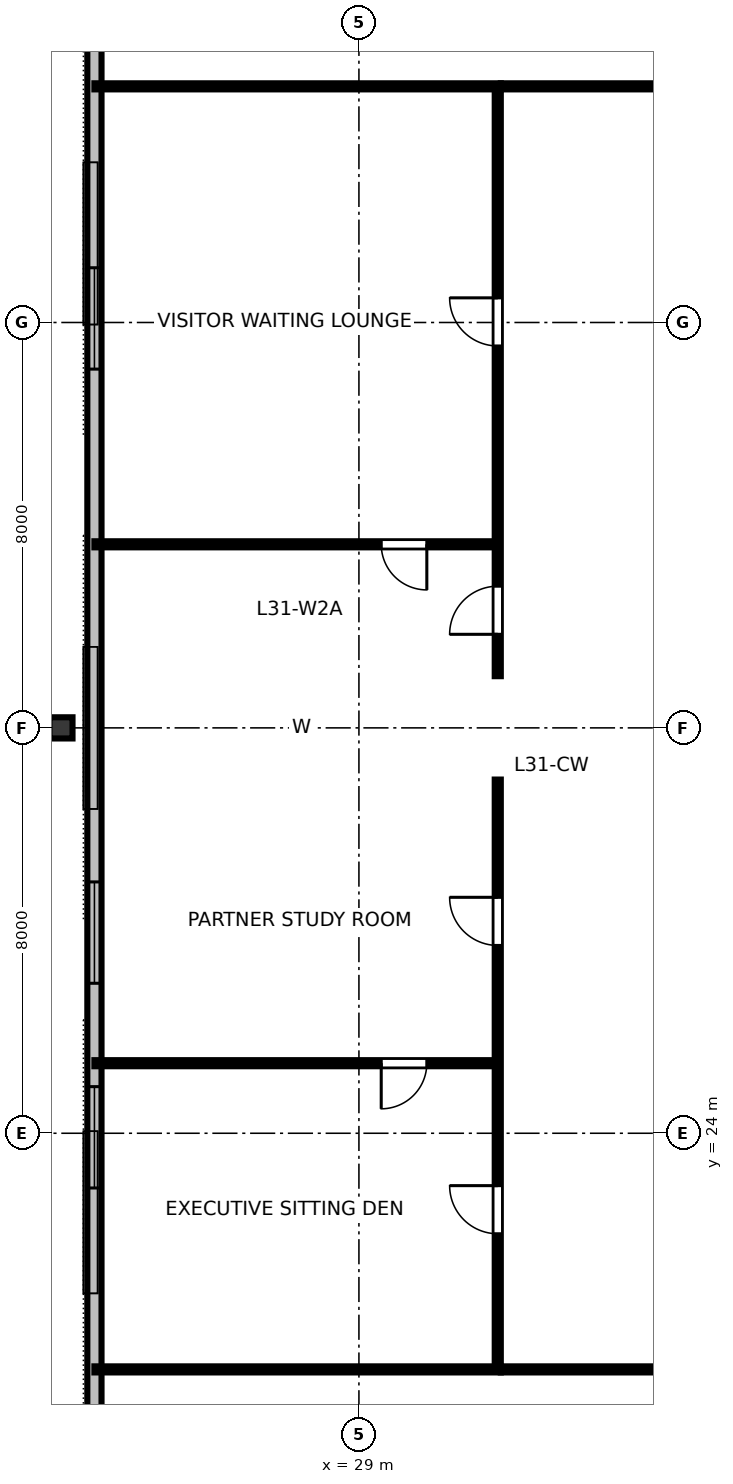
"""IFC4 building model, lengths in metres.
Left out: names, types, materials, properties, quantities, classifications, styles, units other than length and angle.
Written with IfcOpenShell. Run it as: python <this file> out.ifc"""

import sys

from ifc_helpers import new_model, si_unit, direction, frame, frame_2d, origin, origin_2d, place, context, subcontext, project, spatial, rectangle, i_section, extrude, element, fill, save


model = new_model("IFC4")
c1 = context("Model", 3, precision=1e-05, world=origin(), true_north=direction((0.0, 1.0)))
c2 = subcontext(c1, "Body", "Model", "MODEL_VIEW")
j1 = project(units=[si_unit("LENGTHUNIT", "METRE"), si_unit("PLANEANGLEUNIT", "RADIAN")], contexts=[c1])
p1 = place(None, origin())
s1 = spatial("IfcSite", under=j1, at=p1, CompositionType="ELEMENT")
p2 = place(p1, origin())
s2 = spatial("IfcBuilding", under=s1, at=p2, CompositionType="ELEMENT")
p3 = place(p2, frame((0.0, 0.0, 120.4)))
s3 = spatial("IfcBuildingStorey", under=s2, at=p3, CompositionType="ELEMENT", Elevation=120.4)
p4 = place(p3, frame((23.12, 32.0, 0.0), z_axis=(0.0, 0.0, 1.0), x_axis=(0.0, 1.0, 0.0)))
e1 = element("IfcColumn", 1, at=p4, inside=s3, PredefinedType="COLUMN", context=c2, shape_type="SweptSolid", body=[
    extrude(i_section(OverallWidth=0.418, OverallDepth=0.455, WebThickness=0.042, FlangeThickness=0.068, FilletRadius=0.025, at=origin_2d()), origin(), (0.0, 0.0, 1.0), 3.358),
])
p5 = place(p3, frame((23.78, 47.24, 0.0), z_axis=(0.0, 0.0, 1.0), x_axis=(0.0, -1.0, 0.0)))
e2 = element("IfcWall", 2, at=p5, inside=s3, PredefinedType="STANDARD", context=c2, shape_type="SweptSolid", body=[
    extrude(rectangle(XDim=30.48, YDim=0.28, at=frame_2d((15.24, 0.0))), origin(), (0.0, 0.0, 1.0), 3.36),
])
p6 = place(p5, frame((6.16, 0.0, 0.8)))
e3 = element("IfcOpeningElement", 3, at=p6, cuts=e2, PredefinedType="OPENING", context=c2, shape_type="SweptSolid", body=[
    extrude(rectangle(XDim=2.0, YDim=1.95, at=frame_2d((1.0, 0.975))), frame((0.0, 0.15, 0.0), z_axis=(0.0, -1.0, 0.0), x_axis=(1.0, 0.0, 0.0)), (0.0, 0.0, 1.0), 0.3),
])
p7 = place(p5, frame((18.28, 0.0, 0.8)))
e4 = element("IfcOpeningElement", 4, at=p7, cuts=e2, PredefinedType="OPENING", context=c2, shape_type="SweptSolid", body=[
    extrude(rectangle(XDim=2.0, YDim=1.95, at=frame_2d((1.0, 0.975))), frame((0.0, 0.15, 0.0), z_axis=(0.0, -1.0, 0.0), x_axis=(1.0, 0.0, 0.0)), (0.0, 0.0, 1.0), 0.3),
])
p8 = place(p5, frame((22.32, 0.0, 0.8)))
e5 = element("IfcOpeningElement", 5, at=p8, cuts=e2, PredefinedType="OPENING", context=c2, shape_type="SweptSolid", body=[
    extrude(rectangle(XDim=2.0, YDim=1.95, at=frame_2d((1.0, 0.975))), frame((0.0, 0.15, 0.0), z_axis=(0.0, -1.0, 0.0), x_axis=(1.0, 0.0, 0.0)), (0.0, 0.0, 1.0), 0.3),
])
p9 = place(p3, frame((31.8, 19.34, 0.0), z_axis=(0.0, 0.0, 1.0), x_axis=(1.0, 0.0, 0.0)))
e6 = element("IfcWall", 6, at=p9, inside=s3, PredefinedType="PARTITIONING", context=c2, shape_type="SweptSolid", body=[
    extrude(rectangle(XDim=28.4, YDim=0.12, at=frame_2d((14.2, 0.0))), origin(), (0.0, 0.0, 1.0), 2.64),
])
p10 = place(p9, frame((7.878, 0.0, 0.0)))
e7 = element("IfcOpeningElement", 7, at=p10, cuts=e6, PredefinedType="OPENING", context=c2, shape_type="SweptSolid", body=[
    extrude(rectangle(XDim=0.95, YDim=2.15, at=frame_2d((0.475, 1.075))), frame((0.0, 0.07, 0.0), z_axis=(0.0, -1.0, 0.0), x_axis=(1.0, 0.0, 0.0)), (0.0, 0.0, 1.0), 0.14),
])
p11 = place(p9, frame((21.938, 0.0, 0.0)))
e8 = element("IfcOpeningElement", 8, at=p11, cuts=e6, PredefinedType="OPENING", context=c2, shape_type="SweptSolid", body=[
    extrude(rectangle(XDim=0.95, YDim=2.15, at=frame_2d((0.475, 1.075))), frame((0.0, 0.07, 0.0), z_axis=(0.0, -1.0, 0.0), x_axis=(1.0, 0.0, 0.0)), (0.0, 0.0, 1.0), 0.14),
])
p12 = place(p3, frame((31.8, 44.66, 0.0), z_axis=(0.0, 0.0, 1.0), x_axis=(1.0, 0.0, 0.0)))
e9 = element("IfcWall", 9, at=p12, inside=s3, PredefinedType="PARTITIONING", context=c2, shape_type="SweptSolid", body=[
    extrude(rectangle(XDim=28.4, YDim=0.12, at=frame_2d((14.2, 0.0))), origin(), (0.0, 0.0, 1.0), 2.64),
])
p13 = place(p12, frame((4.747, 0.0, 0.0)))
e10 = element("IfcOpeningElement", 10, at=p13, cuts=e9, PredefinedType="OPENING", context=c2, shape_type="SweptSolid", body=[
    extrude(rectangle(XDim=0.95, YDim=2.15, at=frame_2d((0.475, 1.075))), frame((0.0, 0.07, 0.0), z_axis=(0.0, -1.0, 0.0), x_axis=(1.0, 0.0, 0.0)), (0.0, 0.0, 1.0), 0.14),
])
p14 = place(p12, frame((18.807, 0.0, 0.0)))
e11 = element("IfcOpeningElement", 11, at=p14, cuts=e9, PredefinedType="OPENING", context=c2, shape_type="SweptSolid", body=[
    extrude(rectangle(XDim=0.95, YDim=2.15, at=frame_2d((0.475, 1.075))), frame((0.0, 0.07, 0.0), z_axis=(0.0, -1.0, 0.0), x_axis=(1.0, 0.0, 0.0)), (0.0, 0.0, 1.0), 0.14),
])
p15 = place(p3, frame((31.74, 25.383, 0.0), z_axis=(0.0, 0.0, 1.0), x_axis=(-1.0, 0.0, 0.0)))
e12 = element("IfcWall", 12, at=p15, inside=s3, PredefinedType="PARTITIONING", context=c2, shape_type="SweptSolid", body=[
    extrude(rectangle(XDim=7.96, YDim=0.12, at=frame_2d((3.98, 0.0))), origin(), (0.0, 0.0, 1.0), 2.64),
])
p16 = place(p15, frame((1.4, 0.0, 0.0)))
e13 = element("IfcOpeningElement", 13, at=p16, cuts=e12, PredefinedType="OPENING", context=c2, shape_type="SweptSolid", body=[
    extrude(rectangle(XDim=0.9, YDim=2.15, at=frame_2d((0.45, 1.075))), frame((0.0, 0.07, 0.0), z_axis=(0.0, -1.0, 0.0), x_axis=(1.0, 0.0, 0.0)), (0.0, 0.0, 1.0), 0.14),
])
p17 = place(p3, frame((31.74, 35.623, 0.0), z_axis=(0.0, 0.0, 1.0), x_axis=(-1.0, 0.0, 0.0)))
e14 = element("IfcWall", 14, at=p17, inside=s3, PredefinedType="PARTITIONING", context=c2, shape_type="SweptSolid", body=[
    extrude(rectangle(XDim=7.96, YDim=0.12, at=frame_2d((3.98, 0.0))), origin(), (0.0, 0.0, 1.0), 2.64),
])
p18 = place(p17, frame((1.4, 0.0, 0.0)))
e15 = element("IfcOpeningElement", 15, at=p18, cuts=e14, PredefinedType="OPENING", context=c2, shape_type="SweptSolid", body=[
    extrude(rectangle(XDim=0.9, YDim=2.15, at=frame_2d((0.45, 1.075))), frame((0.0, 0.07, 0.0), z_axis=(0.0, -1.0, 0.0), x_axis=(1.0, 0.0, 0.0)), (0.0, 0.0, 1.0), 0.14),
])
p19 = place(p3, frame((31.74, 19.4, 0.0), z_axis=(0.0, 0.0, 1.0), x_axis=(0.0, 1.0, 0.0)))
e16 = element("IfcWall", 16, at=p19, inside=s3, PredefinedType="PARTITIONING", context=c2, shape_type="SweptSolid", body=[
    extrude(rectangle(XDim=11.58, YDim=0.12, at=frame_2d((5.79, 0.0))), origin(), (0.0, 0.0, 1.0), 2.64),
])
p20 = place(p19, frame((2.616, 0.0, 0.0)))
e17 = element("IfcOpeningElement", 17, at=p20, cuts=e16, PredefinedType="OPENING", context=c2, shape_type="SweptSolid", body=[
    extrude(rectangle(XDim=0.95, YDim=2.15, at=frame_2d((0.475, 1.075))), frame((0.0, 0.07, 0.0), z_axis=(0.0, -1.0, 0.0), x_axis=(1.0, 0.0, 0.0)), (0.0, 0.0, 1.0), 0.14),
])
p21 = place(p19, frame((8.306, 0.0, 0.0)))
e18 = element("IfcOpeningElement", 18, at=p21, cuts=e16, PredefinedType="OPENING", context=c2, shape_type="SweptSolid", body=[
    extrude(rectangle(XDim=0.95, YDim=2.15, at=frame_2d((0.475, 1.075))), frame((0.0, 0.07, 0.0), z_axis=(0.0, -1.0, 0.0), x_axis=(1.0, 0.0, 0.0)), (0.0, 0.0, 1.0), 0.14),
])
p22 = place(p3, frame((31.74, 33.02, 0.0), z_axis=(0.0, 0.0, 1.0), x_axis=(0.0, 1.0, 0.0)))
e19 = element("IfcWall", 19, at=p22, inside=s3, PredefinedType="PARTITIONING", context=c2, shape_type="SweptSolid", body=[
    extrude(rectangle(XDim=11.58, YDim=0.12, at=frame_2d((5.79, 0.0))), origin(), (0.0, 0.0, 1.0), 2.64),
])
p23 = place(p22, frame((0.826, 0.0, 0.0)))
e20 = element("IfcOpeningElement", 20, at=p23, cuts=e19, PredefinedType="OPENING", context=c2, shape_type="SweptSolid", body=[
    extrude(rectangle(XDim=0.95, YDim=2.15, at=frame_2d((0.475, 1.075))), frame((0.0, 0.07, 0.0), z_axis=(0.0, -1.0, 0.0), x_axis=(1.0, 0.0, 0.0)), (0.0, 0.0, 1.0), 0.14),
])
p24 = place(p22, frame((6.516, 0.0, 0.0)))
e21 = element("IfcOpeningElement", 21, at=p24, cuts=e19, PredefinedType="OPENING", context=c2, shape_type="SweptSolid", body=[
    extrude(rectangle(XDim=0.95, YDim=2.15, at=frame_2d((0.475, 1.075))), frame((0.0, 0.07, 0.0), z_axis=(0.0, -1.0, 0.0), x_axis=(1.0, 0.0, 0.0)), (0.0, 0.0, 1.0), 0.14),
])
for number, where, z_axis, x_axis in (
    (22, (31.8, 19.34, 0.0), (0.0, 0.0, 1.0), (-1.0, 0.0, 0.0)),
    (23, (31.8, 44.66, 0.0), (0.0, 0.0, 1.0), (-1.0, 0.0, 0.0)),
):
    element("IfcWall", number, at=place(p3, frame(where, z_axis=z_axis, x_axis=x_axis)), inside=s3, PredefinedType="PARTITIONING", context=c2, shape_type="SweptSolid", body=[
        extrude(rectangle(XDim=8.02, YDim=0.12, at=frame_2d((4.01, 0.0))), origin(), (0.0, 0.0, 1.0), 2.64),
    ])
p25 = place(p6, origin())
e24 = element("IfcWindow", 24, at=p25, inside=s3, PartitioningType="SINGLE_PANEL", PredefinedType="WINDOW", context=c2, shape_type="SweptSolid", body=[
    extrude(rectangle(XDim=2.0, YDim=1.95, at=frame_2d((1.0, 0.975))), frame((0.0, 0.03, 0.0), z_axis=(0.0, -1.0, 0.0), x_axis=(1.0, 0.0, 0.0)), (0.0, 0.0, 1.0), 0.06),
])
fill(e3, e24)
p26 = place(p7, origin())
e25 = element("IfcWindow", 25, at=p26, inside=s3, PartitioningType="SINGLE_PANEL", PredefinedType="WINDOW", context=c2, shape_type="SweptSolid", body=[
    extrude(rectangle(XDim=2.0, YDim=1.95, at=frame_2d((1.0, 0.975))), frame((0.0, 0.03, 0.0), z_axis=(0.0, -1.0, 0.0), x_axis=(1.0, 0.0, 0.0)), (0.0, 0.0, 1.0), 0.06),
])
fill(e4, e25)
p27 = place(p8, origin())
e26 = element("IfcWindow", 26, at=p27, inside=s3, PartitioningType="SINGLE_PANEL", PredefinedType="WINDOW", context=c2, shape_type="SweptSolid", body=[
    extrude(rectangle(XDim=2.0, YDim=1.95, at=frame_2d((1.0, 0.975))), frame((0.0, 0.03, 0.0), z_axis=(0.0, -1.0, 0.0), x_axis=(1.0, 0.0, 0.0)), (0.0, 0.0, 1.0), 0.06),
])
fill(e5, e26)
p28 = place(p16, origin())
e27 = element("IfcDoor", 27, at=p28, inside=s3, OperationType="SINGLE_SWING_RIGHT", PredefinedType="DOOR", context=c2, shape_type="SweptSolid", body=[
    extrude(rectangle(XDim=0.9, YDim=2.15, at=frame_2d((0.45, 1.075))), frame((0.0, 0.025, 0.0), z_axis=(0.0, -1.0, 0.0), x_axis=(1.0, 0.0, 0.0)), (0.0, 0.0, 1.0), 0.05),
])
fill(e13, e27)
p29 = place(p18, origin())
e28 = element("IfcDoor", 28, at=p29, inside=s3, OperationType="SINGLE_SWING_LEFT", PredefinedType="DOOR", context=c2, shape_type="SweptSolid", body=[
    extrude(rectangle(XDim=0.9, YDim=2.15, at=frame_2d((0.45, 1.075))), frame((0.0, 0.025, 0.0), z_axis=(0.0, -1.0, 0.0), x_axis=(1.0, 0.0, 0.0)), (0.0, 0.0, 1.0), 0.05),
])
fill(e15, e28)
p30 = place(p20, origin())
e29 = element("IfcDoor", 29, at=p30, inside=s3, OperationType="SINGLE_SWING_RIGHT", PredefinedType="DOOR", context=c2, shape_type="SweptSolid", body=[
    extrude(rectangle(XDim=0.95, YDim=2.15, at=frame_2d((0.475, 1.075))), frame((0.0, 0.025, 0.0), z_axis=(0.0, -1.0, 0.0), x_axis=(1.0, 0.0, 0.0)), (0.0, 0.0, 1.0), 0.05),
])
fill(e17, e29)
p31 = place(p21, origin())
e30 = element("IfcDoor", 30, at=p31, inside=s3, OperationType="SINGLE_SWING_RIGHT", PredefinedType="DOOR", context=c2, shape_type="SweptSolid", body=[
    extrude(rectangle(XDim=0.95, YDim=2.15, at=frame_2d((0.475, 1.075))), frame((0.0, 0.025, 0.0), z_axis=(0.0, -1.0, 0.0), x_axis=(1.0, 0.0, 0.0)), (0.0, 0.0, 1.0), 0.05),
])
fill(e18, e30)
p32 = place(p23, origin())
e31 = element("IfcDoor", 31, at=p32, inside=s3, OperationType="SINGLE_SWING_LEFT", PredefinedType="DOOR", context=c2, shape_type="SweptSolid", body=[
    extrude(rectangle(XDim=0.95, YDim=2.15, at=frame_2d((0.475, 1.075))), frame((0.0, 0.025, 0.0), z_axis=(0.0, -1.0, 0.0), x_axis=(1.0, 0.0, 0.0)), (0.0, 0.0, 1.0), 0.05),
])
fill(e20, e31)
p33 = place(p24, origin())
e32 = element("IfcDoor", 32, at=p33, inside=s3, OperationType="SINGLE_SWING_RIGHT", PredefinedType="DOOR", context=c2, shape_type="SweptSolid", body=[
    extrude(rectangle(XDim=0.95, YDim=2.15, at=frame_2d((0.475, 1.075))), frame((0.0, 0.025, 0.0), z_axis=(0.0, -1.0, 0.0), x_axis=(1.0, 0.0, 0.0)), (0.0, 0.0, 1.0), 0.05),
])
fill(e21, e32)
save(model, sys.argv[1])
